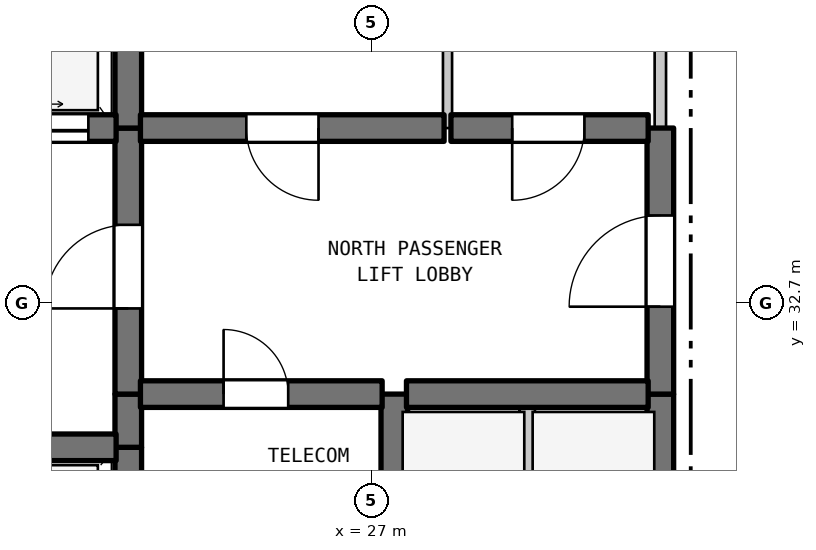
"""IFC4 building model, lengths in metres.
Left out: names, types, materials, properties, quantities, classifications, styles, units other than length and angle.
Written with IfcOpenShell. Run it as: python <this file> out.ifc"""

import sys

from ifc_helpers import new_model, si_unit, direction, frame, frame_2d, origin, place, context, subcontext, project, spatial, rectangle, extrude, element, fill, save


model = new_model("IFC4")
c1 = context("Model", 3, precision=1e-05, world=origin(), true_north=direction((0.0, 1.0)))
c2 = subcontext(c1, "Body", "Model", "MODEL_VIEW")
j1 = project(units=[si_unit("LENGTHUNIT", "METRE"), si_unit("PLANEANGLEUNIT", "RADIAN")], contexts=[c1])
p1 = place(None, origin())
s1 = spatial("IfcSite", under=j1, at=p1, CompositionType="ELEMENT")
p2 = place(p1, origin())
s2 = spatial("IfcBuilding", under=s1, at=p2, CompositionType="ELEMENT")
p3 = place(p2, frame((0.0, 0.0, 172.8)))
s3 = spatial("IfcBuildingStorey", under=s2, at=p3, CompositionType="ELEMENT", Elevation=172.8)
p4 = place(p3, frame((23.8, 29.5, 0.0), z_axis=(0.0, 0.0, 1.0), x_axis=(0.0, 1.0, 0.0)))
e1 = element("IfcWall", 1, at=p4, inside=s3, PredefinedType="SHEAR", context=c2, shape_type="SweptSolid", body=[
    extrude(rectangle(XDim=1.3, YDim=0.35, at=frame_2d((0.65, 0.0))), origin(), (0.0, 0.0, 1.0), 3.39),
])
p5 = place(p3, frame((23.8, 30.8, 0.0), z_axis=(0.0, 0.0, 1.0), x_axis=(0.0, 1.0, 0.0)))
e2 = element("IfcWall", 2, at=p5, inside=s3, PredefinedType="SHEAR", context=c2, shape_type="SweptSolid", body=[
    extrude(rectangle(XDim=0.7, YDim=0.35, at=frame_2d((0.35, 0.0))), origin(), (0.0, 0.0, 1.0), 3.39),
])
p6 = place(p3, frame((23.8, 31.5, 0.0), z_axis=(0.0, 0.0, 1.0), x_axis=(0.0, 1.0, 0.0)))
e3 = element("IfcWall", 3, at=p6, inside=s3, PredefinedType="SHEAR", context=c2, shape_type="SweptSolid", body=[
    extrude(rectangle(XDim=3.5, YDim=0.35, at=frame_2d((1.75, 0.0))), origin(), (0.0, 0.0, 1.0), 3.39),
])
p7 = place(p6, frame((1.127, 0.0, 0.0)))
e4 = element("IfcOpeningElement", 4, at=p7, cuts=e3, PredefinedType="OPENING", context=c2, shape_type="SweptSolid", body=[
    extrude(rectangle(XDim=1.1, YDim=2.15, at=frame_2d((0.55, 1.075))), frame((0.0, 0.185, 0.0), z_axis=(0.0, -1.0, 0.0), x_axis=(1.0, 0.0, 0.0)), (0.0, 0.0, 1.0), 0.37),
])
p8 = place(p3, frame((23.8, 35.0, 0.0), z_axis=(0.0, 0.0, 1.0), x_axis=(0.0, 1.0, 0.0)))
e5 = element("IfcWall", 5, at=p8, inside=s3, PredefinedType="SHEAR", context=c2, shape_type="SweptSolid", body=[
    extrude(rectangle(XDim=2.9, YDim=0.35, at=frame_2d((1.45, 0.0))), origin(), (0.0, 0.0, 1.0), 3.39),
])
p9 = place(p3, frame((27.3, 29.5, 0.0), z_axis=(0.0, 0.0, 1.0), x_axis=(0.0, 1.0, 0.0)))
e6 = element("IfcWall", 6, at=p9, inside=s3, PredefinedType="SHEAR", context=c2, shape_type="SweptSolid", body=[
    extrude(rectangle(XDim=2.0, YDim=0.35, at=frame_2d((1.0, 0.0))), origin(), (0.0, 0.0, 1.0), 3.39),
])
p10 = place(p3, frame((28.0, 35.0, 0.0), z_axis=(0.0, 0.0, 1.0), x_axis=(0.0, 1.0, 0.0)))
e7 = element("IfcWall", 7, at=p10, inside=s3, PredefinedType="PARTITIONING", context=c2, shape_type="SweptSolid", body=[
    extrude(rectangle(XDim=2.9, YDim=0.12, at=frame_2d((1.45, 0.0))), origin(), (0.0, 0.0, 1.0), 3.39),
])
p11 = place(p3, frame((29.05, 28.9, 0.0), z_axis=(0.0, 0.0, 1.0), x_axis=(0.0, 1.0, 0.0)))
e8 = element("IfcWall", 8, at=p11, inside=s3, PredefinedType="STANDARD", context=c2, shape_type="SweptSolid", body=[
    extrude(rectangle(XDim=2.6, YDim=0.2, at=frame_2d((1.3, 0.0))), origin(), (0.0, 0.0, 1.0), 3.39),
])
p12 = place(p3, frame((30.8, 28.9, 0.0), z_axis=(0.0, 0.0, 1.0), x_axis=(0.0, 1.0, 0.0)))
e9 = element("IfcWall", 9, at=p12, inside=s3, PredefinedType="SHEAR", context=c2, shape_type="SweptSolid", body=[
    extrude(rectangle(XDim=2.6, YDim=0.35, at=frame_2d((1.3, 0.0))), origin(), (0.0, 0.0, 1.0), 3.39),
])
p13 = place(p3, frame((30.8, 31.5, 0.0), z_axis=(0.0, 0.0, 1.0), x_axis=(0.0, 1.0, 0.0)))
e10 = element("IfcWall", 10, at=p13, inside=s3, PredefinedType="SHEAR", context=c2, shape_type="SweptSolid", body=[
    extrude(rectangle(XDim=3.5, YDim=0.35, at=frame_2d((1.75, 0.0))), origin(), (0.0, 0.0, 1.0), 3.39),
])
p14 = place(p13, frame((1.15, 0.0, 0.0)))
e11 = element("IfcOpeningElement", 11, at=p14, cuts=e10, PredefinedType="OPENING", context=c2, shape_type="SweptSolid", body=[
    extrude(rectangle(XDim=1.2, YDim=2.2, at=frame_2d((0.6, 1.1))), frame((0.0, 0.185, 0.0), z_axis=(0.0, -1.0, 0.0), x_axis=(1.0, 0.0, 0.0)), (0.0, 0.0, 1.0), 0.37),
])
p15 = place(p3, frame((30.8, 35.0, 0.0), z_axis=(0.0, 0.0, 1.0), x_axis=(0.0, 1.0, 0.0)))
e12 = element("IfcWall", 12, at=p15, inside=s3, PredefinedType="STANDARD", context=c2, shape_type="SweptSolid", body=[
    extrude(rectangle(XDim=2.9, YDim=0.15, at=frame_2d((1.45, 0.0))), origin(), (0.0, 0.0, 1.0), 3.39),
])
p16 = place(p3, frame((19.16, 30.8, 0.0), z_axis=(0.0, 0.0, 1.0), x_axis=(1.0, 0.0, 0.0)))
e13 = element("IfcWall", 13, at=p16, inside=s3, PredefinedType="SHEAR", context=c2, shape_type="SweptSolid", body=[
    extrude(rectangle(XDim=4.48, YDim=0.35, at=frame_2d((2.24, 0.0))), origin(), (0.0, 0.0, 1.0), 3.39),
])
p17 = place(p3, frame((23.96, 31.5, 0.0), z_axis=(0.0, 0.0, 1.0), x_axis=(1.0, 0.0, 0.0)))
e14 = element("IfcWall", 14, at=p17, inside=s3, PredefinedType="SHEAR", context=c2, shape_type="SweptSolid", body=[
    extrude(rectangle(XDim=3.18, YDim=0.35, at=frame_2d((1.59, 0.0))), origin(), (0.0, 0.0, 1.0), 3.39),
])
p18 = place(p17, frame((1.094, 0.0, 0.0)))
e15 = element("IfcOpeningElement", 15, at=p18, cuts=e14, PredefinedType="OPENING", context=c2, shape_type="SweptSolid", body=[
    extrude(rectangle(XDim=0.85, YDim=2.1, at=frame_2d((0.425, 1.05))), frame((0.0, 0.185, 0.0), z_axis=(0.0, -1.0, 0.0), x_axis=(1.0, 0.0, 0.0)), (0.0, 0.0, 1.0), 0.37),
])
p19 = place(p3, frame((27.46, 31.5, 0.0), z_axis=(0.0, 0.0, 1.0), x_axis=(1.0, 0.0, 0.0)))
e16 = element("IfcWall", 16, at=p19, inside=s3, PredefinedType="SHEAR", context=c2, shape_type="SweptSolid", body=[
    extrude(rectangle(XDim=3.18, YDim=0.35, at=frame_2d((1.59, 0.0))), origin(), (0.0, 0.0, 1.0), 3.39),
])
p20 = place(p3, frame((19.16, 35.0, 0.0), z_axis=(0.0, 0.0, 1.0), x_axis=(1.0, 0.0, 0.0)))
e17 = element("IfcWall", 17, at=p20, inside=s3, PredefinedType="SHEAR", context=c2, shape_type="SweptSolid", body=[
    extrude(rectangle(XDim=4.48, YDim=0.35, at=frame_2d((2.24, 0.0))), origin(), (0.0, 0.0, 1.0), 3.39),
])
p21 = place(p20, frame((0.365, 0.0, 0.0)))
e18 = element("IfcOpeningElement", 18, at=p21, cuts=e17, PredefinedType="OPENING", context=c2, shape_type="SweptSolid", body=[
    extrude(rectangle(XDim=1.35, YDim=2.2, at=frame_2d((0.675, 1.1))), frame((0.0, 0.185, 0.0), z_axis=(0.0, -1.0, 0.0), x_axis=(1.0, 0.0, 0.0)), (0.0, 0.0, 1.0), 0.37),
])
p22 = place(p20, frame((2.765, 0.0, 0.0)))
e19 = element("IfcOpeningElement", 19, at=p22, cuts=e17, PredefinedType="OPENING", context=c2, shape_type="SweptSolid", body=[
    extrude(rectangle(XDim=1.35, YDim=2.2, at=frame_2d((0.675, 1.1))), frame((0.0, 0.185, 0.0), z_axis=(0.0, -1.0, 0.0), x_axis=(1.0, 0.0, 0.0)), (0.0, 0.0, 1.0), 0.37),
])
p23 = place(p3, frame((23.96, 35.0, 0.0), z_axis=(0.0, 0.0, 1.0), x_axis=(1.0, 0.0, 0.0)))
e20 = element("IfcWall", 20, at=p23, inside=s3, PredefinedType="SHEAR", context=c2, shape_type="SweptSolid", body=[
    extrude(rectangle(XDim=3.995, YDim=0.35, at=frame_2d((1.998, 0.0))), origin(), (0.0, 0.0, 1.0), 3.39),
])
p24 = place(p23, frame((1.393, 0.0, 0.0)))
e21 = element("IfcOpeningElement", 21, at=p24, cuts=e20, PredefinedType="OPENING", context=c2, shape_type="SweptSolid", body=[
    extrude(rectangle(XDim=0.95, YDim=2.15, at=frame_2d((0.475, 1.075))), frame((0.0, 0.185, 0.0), z_axis=(0.0, -1.0, 0.0), x_axis=(1.0, 0.0, 0.0)), (0.0, 0.0, 1.0), 0.37),
])
p25 = place(p3, frame((28.045, 35.0, 0.0), z_axis=(0.0, 0.0, 1.0), x_axis=(1.0, 0.0, 0.0)))
e22 = element("IfcWall", 22, at=p25, inside=s3, PredefinedType="SHEAR", context=c2, shape_type="SweptSolid", body=[
    extrude(rectangle(XDim=2.595, YDim=0.35, at=frame_2d((1.297, 0.0))), origin(), (0.0, 0.0, 1.0), 3.39),
])
p26 = place(p25, frame((0.806, 0.0, 0.0)))
e23 = element("IfcOpeningElement", 23, at=p26, cuts=e22, PredefinedType="OPENING", context=c2, shape_type="SweptSolid", body=[
    extrude(rectangle(XDim=0.95, YDim=2.15, at=frame_2d((0.475, 1.075))), frame((0.0, 0.185, 0.0), z_axis=(0.0, -1.0, 0.0), x_axis=(1.0, 0.0, 0.0)), (0.0, 0.0, 1.0), 0.37),
])
p27 = place(p7, origin())
e24 = element("IfcDoor", 24, at=p27, inside=s3, OperationType="SINGLE_SWING_LEFT", PredefinedType="DOOR", context=c2, shape_type="SweptSolid", body=[
    extrude(rectangle(XDim=1.1, YDim=2.15, at=frame_2d((0.55, 1.075))), frame((0.0, 0.025, 0.0), z_axis=(0.0, -1.0, 0.0), x_axis=(1.0, 0.0, 0.0)), (0.0, 0.0, 1.0), 0.05),
])
fill(e4, e24)
p28 = place(p14, origin())
e25 = element("IfcDoor", 25, at=p28, inside=s3, OperationType="SINGLE_SWING_LEFT", PredefinedType="DOOR", context=c2, shape_type="SweptSolid", body=[
    extrude(rectangle(XDim=1.2, YDim=2.2, at=frame_2d((0.6, 1.1))), frame((0.0, 0.025, 0.0), z_axis=(0.0, -1.0, 0.0), x_axis=(1.0, 0.0, 0.0)), (0.0, 0.0, 1.0), 0.05),
])
fill(e11, e25)
p29 = place(p18, origin())
e26 = element("IfcDoor", 26, at=p29, inside=s3, OperationType="SINGLE_SWING_LEFT", PredefinedType="DOOR", context=c2, shape_type="SweptSolid", body=[
    extrude(rectangle(XDim=0.85, YDim=2.1, at=frame_2d((0.425, 1.05))), frame((0.0, 0.025, 0.0), z_axis=(0.0, -1.0, 0.0), x_axis=(1.0, 0.0, 0.0)), (0.0, 0.0, 1.0), 0.05),
])
fill(e15, e26)
p30 = place(p22, origin())
e27 = element("IfcDoor", 27, at=p30, inside=s3, OperationType="DOUBLE_DOOR_SLIDING", PredefinedType="DOOR", context=c2, shape_type="SweptSolid", body=[
    extrude(rectangle(XDim=1.35, YDim=2.2, at=frame_2d((0.675, 1.1))), frame((0.0, 0.025, 0.0), z_axis=(0.0, -1.0, 0.0), x_axis=(1.0, 0.0, 0.0)), (0.0, 0.0, 1.0), 0.05),
])
fill(e19, e27)
p31 = place(p24, frame((0.95, 0.0, 0.0), z_axis=(0.0, 0.0, 1.0), x_axis=(-1.0, 0.0, 0.0)))
e28 = element("IfcDoor", 28, at=p31, inside=s3, OperationType="SINGLE_SWING_RIGHT", PredefinedType="DOOR", context=c2, shape_type="SweptSolid", body=[
    extrude(rectangle(XDim=0.95, YDim=2.15, at=frame_2d((0.475, 1.075))), frame((0.0, 0.025, 0.0), z_axis=(0.0, -1.0, 0.0), x_axis=(1.0, 0.0, 0.0)), (0.0, 0.0, 1.0), 0.05),
])
fill(e21, e28)
p32 = place(p26, frame((0.95, 0.0, 0.0), z_axis=(0.0, 0.0, 1.0), x_axis=(-1.0, 0.0, 0.0)))
e29 = element("IfcDoor", 29, at=p32, inside=s3, OperationType="SINGLE_SWING_LEFT", PredefinedType="DOOR", context=c2, shape_type="SweptSolid", body=[
    extrude(rectangle(XDim=0.95, YDim=2.15, at=frame_2d((0.475, 1.075))), frame((0.0, 0.025, 0.0), z_axis=(0.0, -1.0, 0.0), x_axis=(1.0, 0.0, 0.0)), (0.0, 0.0, 1.0), 0.05),
])
fill(e23, e29)
save(model, sys.argv[1])
